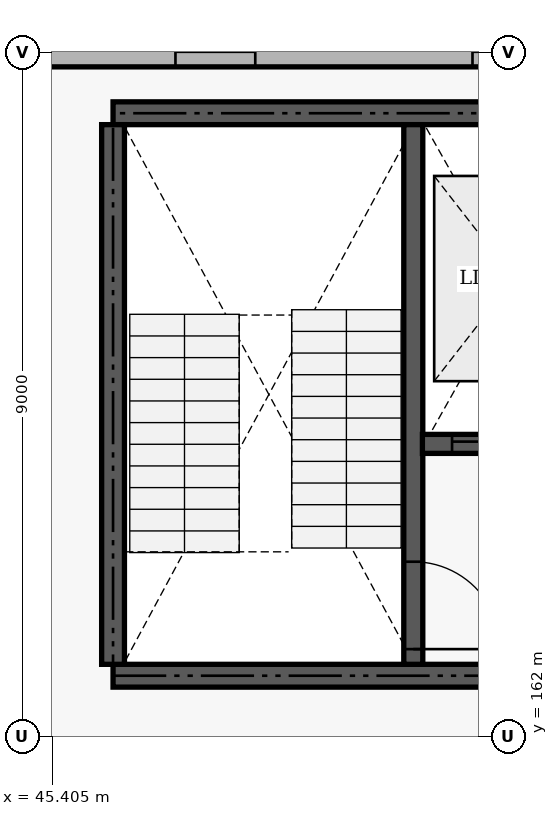
"""IFC4 building model, lengths in metres.
Left out: names, types, materials, properties, quantities, classifications, styles, units other than length and angle.
Written with IfcOpenShell. Run it as: python <this file> out.ifc"""

import sys

from ifc_helpers import new_model, si_unit, direction, frame, frame_2d, origin, place, context, subcontext, project, spatial, rectangle, extrude, element, fill, save


model = new_model("IFC4")
c1 = context("Model", 3, precision=1e-05, world=origin(), true_north=direction((0.0, 1.0)))
c2 = subcontext(c1, "Body", "Model", "MODEL_VIEW")
j1 = project(units=[si_unit("LENGTHUNIT", "METRE"), si_unit("PLANEANGLEUNIT", "RADIAN")], contexts=[c1])
p1 = place(None, origin())
s1 = spatial("IfcSite", under=j1, at=p1, CompositionType="ELEMENT")
p2 = place(p1, origin())
s2 = spatial("IfcBuilding", under=s1, at=p2, CompositionType="ELEMENT")
p3 = place(p2, frame((0.0, 0.0, 5.4)))
s3 = spatial("IfcBuildingStorey", under=s2, at=p3, CompositionType="ELEMENT", Elevation=5.4)
p4 = place(p3, frame((45.06, 171.0, 0.0), z_axis=(0.0, 0.0, 1.0), x_axis=(1.0, 0.0, 0.0)))
e1 = element("IfcWall", 1, at=p4, inside=s3, PredefinedType="SOLIDWALL", context=c2, shape_type="SweptSolid", body=[
    extrude(rectangle(XDim=8.88, YDim=0.38, at=frame_2d((4.44, 0.0))), origin(), (0.0, 0.0, 1.0), 3.4),
])
p5 = place(p4, frame((1.961, 0.0, 0.9)))
e2 = element("IfcOpeningElement", 2, at=p5, cuts=e1, PredefinedType="OPENING", context=c2, shape_type="SweptSolid", body=[
    extrude(rectangle(XDim=1.05, YDim=1.35, at=frame_2d((0.525, 0.675))), frame((0.0, 0.2, 0.0), z_axis=(0.0, -1.0, 0.0), x_axis=(1.0, 0.0, 0.0)), (0.0, 0.0, 1.0), 0.4),
])
p6 = place(p4, frame((5.869, 0.0, 0.9)))
e3 = element("IfcOpeningElement", 3, at=p6, cuts=e1, PredefinedType="OPENING", context=c2, shape_type="SweptSolid", body=[
    extrude(rectangle(XDim=1.05, YDim=1.35, at=frame_2d((0.525, 0.675))), frame((0.0, 0.2, 0.0), z_axis=(0.0, -1.0, 0.0), x_axis=(1.0, 0.0, 0.0)), (0.0, 0.0, 1.0), 0.4),
])
for number, where, z_axis, x_axis in (
    (4, (46.2, 162.8, 0.0), (0.0, 0.0, 1.0), (1.0, 0.0, 0.0)),
    (5, (46.2, 170.2, 0.0), (0.0, 0.0, 1.0), (1.0, 0.0, 0.0)),
):
    element("IfcWall", number, at=place(p3, frame(where, z_axis=z_axis, x_axis=x_axis)), inside=s3, PredefinedType="SHEAR", context=c2, shape_type="SweptSolid", body=[
        extrude(rectangle(XDim=6.6, YDim=0.3, at=frame_2d((3.3, 0.0))), origin(), (0.0, 0.0, 1.0), 4.2),
    ])
p7 = place(p3, frame((46.2, 162.95, 0.0), z_axis=(0.0, 0.0, 1.0), x_axis=(0.0, 1.0, 0.0)))
e6 = element("IfcWall", 6, at=p7, inside=s3, PredefinedType="SHEAR", context=c2, shape_type="SweptSolid", body=[
    extrude(rectangle(XDim=7.1, YDim=0.3, at=frame_2d((3.55, 0.0))), origin(), (0.0, 0.0, 1.0), 4.2),
])
p8 = place(p3, frame((50.15, 162.95, 0.0), z_axis=(0.0, 0.0, 1.0), x_axis=(0.0, 1.0, 0.0)))
e7 = element("IfcWall", 7, at=p8, inside=s3, PredefinedType="SHEAR", context=c2, shape_type="SweptSolid", body=[
    extrude(rectangle(XDim=7.1, YDim=0.25, at=frame_2d((3.55, 0.0))), origin(), (0.0, 0.0, 1.0), 4.2),
])
p9 = place(p8, frame((0.2, 0.0, 0.0)))
e8 = element("IfcOpeningElement", 8, at=p9, cuts=e7, PredefinedType="OPENING", context=c2, shape_type="SweptSolid", body=[
    extrude(rectangle(XDim=1.15, YDim=2.15, at=frame_2d((0.575, 1.075))), frame((0.0, 0.135, 0.0), z_axis=(0.0, -1.0, 0.0), x_axis=(1.0, 0.0, 0.0)), (0.0, 0.0, 1.0), 0.27),
])
p10 = place(p3, frame((50.27, 165.85, 0.0), z_axis=(0.0, 0.0, 1.0), x_axis=(1.0, 0.0, 0.0)))
e9 = element("IfcWall", 9, at=p10, inside=s3, PredefinedType="SHEAR", context=c2, shape_type="SweptSolid", body=[
    extrude(rectangle(XDim=2.38, YDim=0.25, at=frame_2d((1.19, 0.0))), origin(), (0.0, 0.0, 1.0), 4.2),
])
p11 = place(p10, frame((0.39, 0.0, 0.0)))
e10 = element("IfcOpeningElement", 10, at=p11, cuts=e9, PredefinedType="OPENING", context=c2, shape_type="SweptSolid", body=[
    extrude(rectangle(XDim=1.6, YDim=2.3, at=frame_2d((0.8, 1.15))), frame((0.0, 0.135, 0.0), z_axis=(0.0, -1.0, 0.0), x_axis=(1.0, 0.0, 0.0)), (0.0, 0.0, 1.0), 0.27),
])
p12 = place(p5, origin())
e11 = element("IfcWindow", 11, at=p12, inside=s3, PartitioningType="SINGLE_PANEL", PredefinedType="WINDOW", context=c2, shape_type="SweptSolid", body=[
    extrude(rectangle(XDim=1.05, YDim=1.35, at=frame_2d((0.525, 0.675))), frame((0.0, 0.03, 0.0), z_axis=(0.0, -1.0, 0.0), x_axis=(1.0, 0.0, 0.0)), (0.0, 0.0, 1.0), 0.06),
])
fill(e2, e11)
p13 = place(p6, origin())
e12 = element("IfcWindow", 12, at=p13, inside=s3, PartitioningType="SINGLE_PANEL", PredefinedType="WINDOW", context=c2, shape_type="SweptSolid", body=[
    extrude(rectangle(XDim=1.05, YDim=1.35, at=frame_2d((0.525, 0.675))), frame((0.0, 0.03, 0.0), z_axis=(0.0, -1.0, 0.0), x_axis=(1.0, 0.0, 0.0)), (0.0, 0.0, 1.0), 0.06),
])
fill(e3, e12)
p14 = place(p9, frame((1.15, 0.0, 0.0), z_axis=(0.0, 0.0, 1.0), x_axis=(-1.0, 0.0, 0.0)))
e13 = element("IfcDoor", 13, at=p14, inside=s3, OperationType="SINGLE_SWING_LEFT", PredefinedType="DOOR", context=c2, shape_type="SweptSolid", body=[
    extrude(rectangle(XDim=1.15, YDim=2.15, at=frame_2d((0.575, 1.075))), frame((0.0, 0.025, 0.0), z_axis=(0.0, -1.0, 0.0), x_axis=(1.0, 0.0, 0.0)), (0.0, 0.0, 1.0), 0.05),
])
fill(e8, e13)
p15 = place(p11, origin())
e14 = element("IfcDoor", 14, at=p15, inside=s3, OperationType="SLIDING_TO_LEFT", PredefinedType="DOOR", context=c2, shape_type="SweptSolid", body=[
    extrude(rectangle(XDim=1.6, YDim=2.3, at=frame_2d((0.8, 1.15))), frame((0.0, 0.025, 0.0), z_axis=(0.0, -1.0, 0.0), x_axis=(1.0, 0.0, 0.0)), (0.0, 0.0, 1.0), 0.05),
])
fill(e10, e14)
save(model, sys.argv[1])
